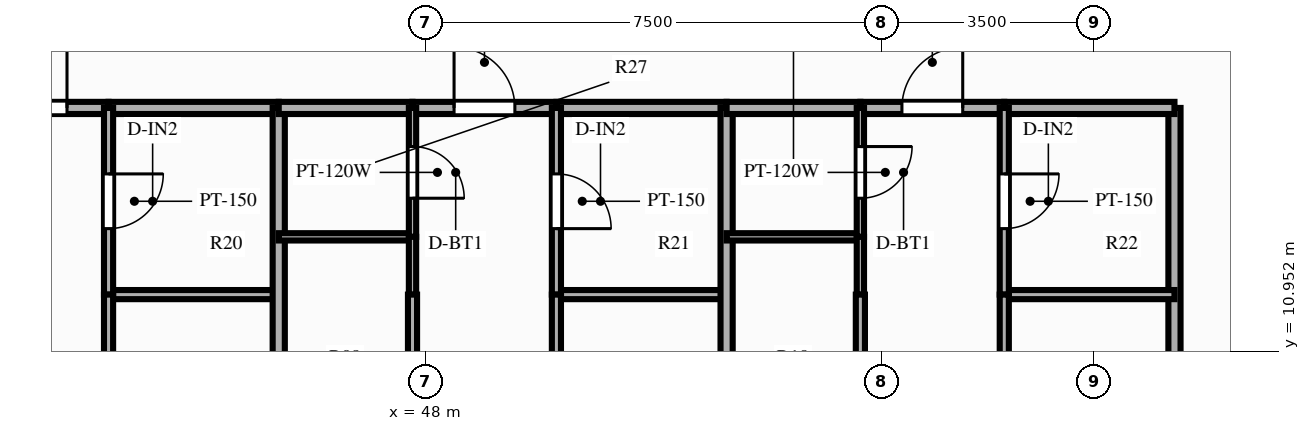
"""IFC4 building model, lengths in metres.
Left out: names, types, materials, properties, quantities, classifications, styles, units other than length and angle.
Written with IfcOpenShell. Run it as: python <this file> out.ifc"""

import sys

from ifc_helpers import new_model, si_unit, direction, frame, frame_2d, origin, place, context, subcontext, project, spatial, rectangle, extrude, source, transform, mapped, element, fill, save


model = new_model("IFC4")
c1 = context("Model", 3, precision=1e-05, world=origin(), true_north=direction((0.0, 1.0)))
c2 = subcontext(c1, "Body", "Model", "MODEL_VIEW")
j1 = project(units=[si_unit("LENGTHUNIT", "METRE"), si_unit("PLANEANGLEUNIT", "RADIAN")], contexts=[c1])
p1 = place(None, origin())
s1 = spatial("IfcSite", under=j1, at=p1, CompositionType="ELEMENT")
p2 = place(p1, origin())
s2 = spatial("IfcBuilding", under=s1, at=p2, CompositionType="ELEMENT")
p3 = place(p2, frame((0.0, 0.0, 22.4)))
s3 = spatial("IfcBuildingStorey", under=s2, at=p3, CompositionType="ELEMENT", Elevation=22.4)
p4 = place(p3, frame((60.32, 14.95, 0.0), z_axis=(0.0, 0.0, 1.0), x_axis=(0.0, -1.0, 0.0)))
e1 = element("IfcWall", 1, at=p4, inside=s3, PredefinedType="PARTITIONING", context=c2, shape_type="SweptSolid", body=[
    extrude(rectangle(XDim=11.8, YDim=0.2, at=frame_2d((5.9, 0.0))), origin(), (0.0, 0.0, 1.0), 2.79),
])
p5 = place(p3, frame((40.423, 14.95, 0.0), z_axis=(0.0, 0.0, 1.0), x_axis=(1.0, 0.0, 0.0)))
e2 = element("IfcWall", 2, at=p5, inside=s3, PredefinedType="PARTITIONING", context=c2, shape_type="SweptSolid", body=[
    extrude(rectangle(XDim=2.367, YDim=0.2, at=frame_2d((1.183, 0.0))), origin(), (0.0, 0.0, 1.0), 2.79),
])
p6 = place(p5, frame((0.683, 0.0, 0.0)))
e3 = element("IfcOpeningElement", 3, at=p6, cuts=e2, PredefinedType="OPENING", context=c2, shape_type="SweptSolid", body=[
    extrude(rectangle(XDim=1.0, YDim=2.15, at=frame_2d((0.5, 1.075))), frame((0.0, 0.112, 0.0), z_axis=(0.0, -1.0, 0.0), x_axis=(1.0, 0.0, 0.0)), (0.0, 0.0, 1.0), 0.224),
])
p7 = place(p3, frame((42.79, 14.95, 0.0), z_axis=(0.0, 0.0, 1.0), x_axis=(1.0, 0.0, 0.0)))
e4 = element("IfcWall", 4, at=p7, inside=s3, PredefinedType="PARTITIONING", context=c2, shape_type="SweptSolid", body=[
    extrude(rectangle(XDim=2.799, YDim=0.2, at=frame_2d((1.399, 0.0))), origin(), (0.0, 0.0, 1.0), 2.79),
])
p8 = place(p3, frame((42.79, 11.88, 0.0), z_axis=(0.0, 0.0, 1.0), x_axis=(1.0, 0.0, 0.0)))
e5 = element("IfcWall", 5, at=p8, inside=s3, PredefinedType="PARTITIONING", context=c2, shape_type="SweptSolid", body=[
    extrude(rectangle(XDim=2.799, YDim=0.15, at=frame_2d((1.399, 0.0))), origin(), (0.0, 0.0, 1.0), 2.79),
])
p9 = place(p3, frame((42.79, 14.95, 0.0), z_axis=(0.0, 0.0, 1.0), x_axis=(0.0, -1.0, 0.0)))
e6 = element("IfcWall", 6, at=p9, inside=s3, PredefinedType="PARTITIONING", context=c2, shape_type="SweptSolid", body=[
    extrude(rectangle(XDim=3.07, YDim=0.15, at=frame_2d((1.535, 0.0))), origin(), (0.0, 0.0, 1.0), 2.79),
])
p10 = place(p9, frame((1.085, 0.0, 0.0)))
e7 = element("IfcOpeningElement", 7, at=p10, cuts=e6, PredefinedType="OPENING", context=c2, shape_type="SweptSolid", body=[
    extrude(rectangle(XDim=0.9, YDim=2.1, at=frame_2d((0.45, 1.05))), frame((0.0, 0.087, 0.0), z_axis=(0.0, -1.0, 0.0), x_axis=(1.0, 0.0, 0.0)), (0.0, 0.0, 1.0), 0.174),
])
p11 = place(p3, frame((42.79, 11.88, 0.0), z_axis=(0.0, 0.0, 1.0), x_axis=(0.0, -1.0, 0.0)))
e8 = element("IfcWall", 8, at=p11, inside=s3, PredefinedType="PARTITIONING", context=c2, shape_type="SweptSolid", body=[
    extrude(rectangle(XDim=8.73, YDim=0.15, at=frame_2d((4.365, 0.0))), origin(), (0.0, 0.0, 1.0), 2.79),
])
p12 = place(p11, frame((3.609, 0.0, 0.0)))
e9 = element("IfcOpeningElement", 9, at=p12, cuts=e8, PredefinedType="OPENING", context=c2, shape_type="SweptSolid", body=[
    extrude(rectangle(XDim=0.9, YDim=2.1, at=frame_2d((0.45, 1.05))), frame((0.0, 0.087, 0.0), z_axis=(0.0, -1.0, 0.0), x_axis=(1.0, 0.0, 0.0)), (0.0, 0.0, 1.0), 0.174),
])
p13 = place(p3, frame((45.589, 14.95, 0.0), z_axis=(0.0, 0.0, 1.0), x_axis=(0.0, -1.0, 0.0)))
e10 = element("IfcWall", 10, at=p13, inside=s3, PredefinedType="PARTITIONING", context=c2, shape_type="SweptSolid", body=[
    extrude(rectangle(XDim=11.8, YDim=0.2, at=frame_2d((5.9, 0.0))), origin(), (0.0, 0.0, 1.0), 2.24),
])
p14 = place(p3, frame((45.589, 14.95, 0.0), z_axis=(0.0, 0.0, 1.0), x_axis=(1.0, 0.0, 0.0)))
e11 = element("IfcWall", 11, at=p14, inside=s3, PredefinedType="PARTITIONING", context=c2, shape_type="SweptSolid", body=[
    extrude(rectangle(XDim=2.2, YDim=0.2, at=frame_2d((1.1, 0.0))), origin(), (0.0, 0.0, 1.0), 2.79),
])
p15 = place(p3, frame((47.789, 14.95, 0.0), z_axis=(0.0, 0.0, 1.0), x_axis=(1.0, 0.0, 0.0)))
e12 = element("IfcWall", 12, at=p15, inside=s3, PredefinedType="PARTITIONING", context=c2, shape_type="SweptSolid", body=[
    extrude(rectangle(XDim=2.367, YDim=0.2, at=frame_2d((1.183, 0.0))), origin(), (0.0, 0.0, 1.0), 2.79),
])
p16 = place(p15, frame((0.683, 0.0, 0.0)))
e13 = element("IfcOpeningElement", 13, at=p16, cuts=e12, PredefinedType="OPENING", context=c2, shape_type="SweptSolid", body=[
    extrude(rectangle(XDim=1.0, YDim=2.15, at=frame_2d((0.5, 1.075))), frame((0.0, 0.112, 0.0), z_axis=(0.0, -1.0, 0.0), x_axis=(1.0, 0.0, 0.0)), (0.0, 0.0, 1.0), 0.224),
])
p17 = place(p3, frame((50.156, 14.95, 0.0), z_axis=(0.0, 0.0, 1.0), x_axis=(1.0, 0.0, 0.0)))
e14 = element("IfcWall", 14, at=p17, inside=s3, PredefinedType="PARTITIONING", context=c2, shape_type="SweptSolid", body=[
    extrude(rectangle(XDim=2.799, YDim=0.2, at=frame_2d((1.399, 0.0))), origin(), (0.0, 0.0, 1.0), 2.79),
])
p18 = place(p3, frame((45.589, 12.83, 0.0), z_axis=(0.0, 0.0, 1.0), x_axis=(1.0, 0.0, 0.0)))
e15 = element("IfcWall", 15, at=p18, inside=s3, PredefinedType="PARTITIONING", context=c2, shape_type="SweptSolid", body=[
    extrude(rectangle(XDim=2.2, YDim=0.12, at=frame_2d((1.1, 0.0))), origin(), (0.0, 0.0, 1.0), 2.79),
])
p19 = place(p3, frame((50.156, 11.88, 0.0), z_axis=(0.0, 0.0, 1.0), x_axis=(1.0, 0.0, 0.0)))
e16 = element("IfcWall", 16, at=p19, inside=s3, PredefinedType="PARTITIONING", context=c2, shape_type="SweptSolid", body=[
    extrude(rectangle(XDim=2.799, YDim=0.15, at=frame_2d((1.399, 0.0))), origin(), (0.0, 0.0, 1.0), 2.79),
])
p20 = place(p3, frame((47.789, 14.95, 0.0), z_axis=(0.0, 0.0, 1.0), x_axis=(0.0, -1.0, 0.0)))
e17 = element("IfcWall", 17, at=p20, inside=s3, PredefinedType="PARTITIONING", context=c2, shape_type="SweptSolid", body=[
    extrude(rectangle(XDim=2.12, YDim=0.12, at=frame_2d((1.06, 0.0))), origin(), (0.0, 0.0, 1.0), 2.79),
])
p21 = place(p20, frame((0.635, 0.0, 0.0)))
e18 = element("IfcOpeningElement", 18, at=p21, cuts=e17, PredefinedType="OPENING", context=c2, shape_type="SweptSolid", body=[
    extrude(rectangle(XDim=0.85, YDim=2.05, at=frame_2d((0.425, 1.025))), frame((0.0, 0.072, 0.0), z_axis=(0.0, -1.0, 0.0), x_axis=(1.0, 0.0, 0.0)), (0.0, 0.0, 1.0), 0.144),
])
p22 = place(p3, frame((47.789, 12.83, 0.0), z_axis=(0.0, 0.0, 1.0), x_axis=(0.0, -1.0, 0.0)))
e19 = element("IfcWall", 19, at=p22, inside=s3, PredefinedType="PARTITIONING", context=c2, shape_type="SweptSolid", body=[
    extrude(rectangle(XDim=0.95, YDim=0.12, at=frame_2d((0.475, 0.0))), origin(), (0.0, 0.0, 1.0), 2.79),
])
p23 = place(p3, frame((47.789, 11.88, 0.0), z_axis=(0.0, 0.0, 1.0), x_axis=(0.0, -1.0, 0.0)))
e20 = element("IfcWall", 20, at=p23, inside=s3, PredefinedType="PARTITIONING", context=c2, shape_type="SweptSolid", body=[
    extrude(rectangle(XDim=8.73, YDim=0.15, at=frame_2d((4.365, 0.0))), origin(), (0.0, 0.0, 1.0), 2.79),
])
p24 = place(p23, frame((3.609, 0.0, 0.0)))
e21 = element("IfcOpeningElement", 21, at=p24, cuts=e20, PredefinedType="OPENING", context=c2, shape_type="SweptSolid", body=[
    extrude(rectangle(XDim=0.9, YDim=2.1, at=frame_2d((0.45, 1.05))), frame((0.0, 0.087, 0.0), z_axis=(0.0, -1.0, 0.0), x_axis=(1.0, 0.0, 0.0)), (0.0, 0.0, 1.0), 0.174),
])
p25 = place(p3, frame((50.156, 14.95, 0.0), z_axis=(0.0, 0.0, 1.0), x_axis=(0.0, -1.0, 0.0)))
e22 = element("IfcWall", 22, at=p25, inside=s3, PredefinedType="PARTITIONING", context=c2, shape_type="SweptSolid", body=[
    extrude(rectangle(XDim=3.07, YDim=0.15, at=frame_2d((1.535, 0.0))), origin(), (0.0, 0.0, 1.0), 2.79),
])
p26 = place(p25, frame((1.085, 0.0, 0.0)))
e23 = element("IfcOpeningElement", 23, at=p26, cuts=e22, PredefinedType="OPENING", context=c2, shape_type="SweptSolid", body=[
    extrude(rectangle(XDim=0.9, YDim=2.1, at=frame_2d((0.45, 1.05))), frame((0.0, 0.087, 0.0), z_axis=(0.0, -1.0, 0.0), x_axis=(1.0, 0.0, 0.0)), (0.0, 0.0, 1.0), 0.174),
])
p27 = place(p3, frame((50.156, 11.88, 0.0), z_axis=(0.0, 0.0, 1.0), x_axis=(0.0, -1.0, 0.0)))
e24 = element("IfcWall", 24, at=p27, inside=s3, PredefinedType="PARTITIONING", context=c2, shape_type="SweptSolid", body=[
    extrude(rectangle(XDim=8.73, YDim=0.15, at=frame_2d((4.365, 0.0))), origin(), (0.0, 0.0, 1.0), 2.79),
])
p28 = place(p27, frame((3.609, 0.0, 0.0)))
e25 = element("IfcOpeningElement", 25, at=p28, cuts=e24, PredefinedType="OPENING", context=c2, shape_type="SweptSolid", body=[
    extrude(rectangle(XDim=0.9, YDim=2.1, at=frame_2d((0.45, 1.05))), frame((0.0, 0.087, 0.0), z_axis=(0.0, -1.0, 0.0), x_axis=(1.0, 0.0, 0.0)), (0.0, 0.0, 1.0), 0.174),
])
p29 = place(p3, frame((52.954, 14.95, 0.0), z_axis=(0.0, 0.0, 1.0), x_axis=(0.0, -1.0, 0.0)))
e26 = element("IfcWall", 26, at=p29, inside=s3, PredefinedType="PARTITIONING", context=c2, shape_type="SweptSolid", body=[
    extrude(rectangle(XDim=11.8, YDim=0.2, at=frame_2d((5.9, 0.0))), origin(), (0.0, 0.0, 1.0), 2.79),
])
p30 = place(p3, frame((52.954, 14.95, 0.0), z_axis=(0.0, 0.0, 1.0), x_axis=(1.0, 0.0, 0.0)))
e27 = element("IfcWall", 27, at=p30, inside=s3, PredefinedType="PARTITIONING", context=c2, shape_type="SweptSolid", body=[
    extrude(rectangle(XDim=2.2, YDim=0.2, at=frame_2d((1.1, 0.0))), origin(), (0.0, 0.0, 1.0), 2.79),
])
p31 = place(p3, frame((55.154, 14.95, 0.0), z_axis=(0.0, 0.0, 1.0), x_axis=(1.0, 0.0, 0.0)))
e28 = element("IfcWall", 28, at=p31, inside=s3, PredefinedType="PARTITIONING", context=c2, shape_type="SweptSolid", body=[
    extrude(rectangle(XDim=2.367, YDim=0.2, at=frame_2d((1.183, 0.0))), origin(), (0.0, 0.0, 1.0), 2.79),
])
p32 = place(p31, frame((0.683, 0.0, 0.0)))
e29 = element("IfcOpeningElement", 29, at=p32, cuts=e28, PredefinedType="OPENING", context=c2, shape_type="SweptSolid", body=[
    extrude(rectangle(XDim=1.0, YDim=2.15, at=frame_2d((0.5, 1.075))), frame((0.0, 0.112, 0.0), z_axis=(0.0, -1.0, 0.0), x_axis=(1.0, 0.0, 0.0)), (0.0, 0.0, 1.0), 0.224),
])
p33 = place(p3, frame((57.521, 14.95, 0.0), z_axis=(0.0, 0.0, 1.0), x_axis=(1.0, 0.0, 0.0)))
e30 = element("IfcWall", 30, at=p33, inside=s3, PredefinedType="PARTITIONING", context=c2, shape_type="SweptSolid", body=[
    extrude(rectangle(XDim=2.799, YDim=0.2, at=frame_2d((1.399, 0.0))), origin(), (0.0, 0.0, 1.0), 2.79),
])
p34 = place(p3, frame((52.954, 12.83, 0.0), z_axis=(0.0, 0.0, 1.0), x_axis=(1.0, 0.0, 0.0)))
e31 = element("IfcWall", 31, at=p34, inside=s3, PredefinedType="PARTITIONING", context=c2, shape_type="SweptSolid", body=[
    extrude(rectangle(XDim=2.2, YDim=0.12, at=frame_2d((1.1, 0.0))), origin(), (0.0, 0.0, 1.0), 2.79),
])
p35 = place(p3, frame((57.521, 11.88, 0.0), z_axis=(0.0, 0.0, 1.0), x_axis=(1.0, 0.0, 0.0)))
e32 = element("IfcWall", 32, at=p35, inside=s3, PredefinedType="PARTITIONING", context=c2, shape_type="SweptSolid", body=[
    extrude(rectangle(XDim=2.799, YDim=0.15, at=frame_2d((1.399, 0.0))), origin(), (0.0, 0.0, 1.0), 2.79),
])
p36 = place(p3, frame((55.154, 14.95, 0.0), z_axis=(0.0, 0.0, 1.0), x_axis=(0.0, -1.0, 0.0)))
e33 = element("IfcWall", 33, at=p36, inside=s3, PredefinedType="PARTITIONING", context=c2, shape_type="SweptSolid", body=[
    extrude(rectangle(XDim=2.12, YDim=0.12, at=frame_2d((1.06, 0.0))), origin(), (0.0, 0.0, 1.0), 2.79),
])
p37 = place(p36, frame((0.635, 0.0, 0.0)))
e34 = element("IfcOpeningElement", 34, at=p37, cuts=e33, PredefinedType="OPENING", context=c2, shape_type="SweptSolid", body=[
    extrude(rectangle(XDim=0.85, YDim=2.05, at=frame_2d((0.425, 1.025))), frame((0.0, 0.072, 0.0), z_axis=(0.0, -1.0, 0.0), x_axis=(1.0, 0.0, 0.0)), (0.0, 0.0, 1.0), 0.144),
])
p38 = place(p3, frame((55.154, 12.83, 0.0), z_axis=(0.0, 0.0, 1.0), x_axis=(0.0, -1.0, 0.0)))
e35 = element("IfcWall", 35, at=p38, inside=s3, PredefinedType="PARTITIONING", context=c2, shape_type="SweptSolid", body=[
    extrude(rectangle(XDim=0.95, YDim=0.12, at=frame_2d((0.475, 0.0))), origin(), (0.0, 0.0, 1.0), 2.79),
])
p39 = place(p3, frame((55.154, 11.88, 0.0), z_axis=(0.0, 0.0, 1.0), x_axis=(0.0, -1.0, 0.0)))
e36 = element("IfcWall", 36, at=p39, inside=s3, PredefinedType="PARTITIONING", context=c2, shape_type="SweptSolid", body=[
    extrude(rectangle(XDim=8.73, YDim=0.15, at=frame_2d((4.365, 0.0))), origin(), (0.0, 0.0, 1.0), 2.79),
])
p40 = place(p39, frame((3.609, 0.0, 0.0)))
e37 = element("IfcOpeningElement", 37, at=p40, cuts=e36, PredefinedType="OPENING", context=c2, shape_type="SweptSolid", body=[
    extrude(rectangle(XDim=0.9, YDim=2.1, at=frame_2d((0.45, 1.05))), frame((0.0, 0.087, 0.0), z_axis=(0.0, -1.0, 0.0), x_axis=(1.0, 0.0, 0.0)), (0.0, 0.0, 1.0), 0.174),
])
p41 = place(p3, frame((57.521, 14.95, 0.0), z_axis=(0.0, 0.0, 1.0), x_axis=(0.0, -1.0, 0.0)))
e38 = element("IfcWall", 38, at=p41, inside=s3, PredefinedType="PARTITIONING", context=c2, shape_type="SweptSolid", body=[
    extrude(rectangle(XDim=3.07, YDim=0.15, at=frame_2d((1.535, 0.0))), origin(), (0.0, 0.0, 1.0), 2.79),
])
p42 = place(p41, frame((1.085, 0.0, 0.0)))
e39 = element("IfcOpeningElement", 39, at=p42, cuts=e38, PredefinedType="OPENING", context=c2, shape_type="SweptSolid", body=[
    extrude(rectangle(XDim=0.9, YDim=2.1, at=frame_2d((0.45, 1.05))), frame((0.0, 0.087, 0.0), z_axis=(0.0, -1.0, 0.0), x_axis=(1.0, 0.0, 0.0)), (0.0, 0.0, 1.0), 0.174),
])
p43 = place(p3, frame((57.521, 11.88, 0.0), z_axis=(0.0, 0.0, 1.0), x_axis=(0.0, -1.0, 0.0)))
e40 = element("IfcWall", 40, at=p43, inside=s3, PredefinedType="PARTITIONING", context=c2, shape_type="SweptSolid", body=[
    extrude(rectangle(XDim=8.73, YDim=0.15, at=frame_2d((4.365, 0.0))), origin(), (0.0, 0.0, 1.0), 2.79),
])
p44 = place(p43, frame((3.609, 0.0, 0.0)))
e41 = element("IfcOpeningElement", 41, at=p44, cuts=e40, PredefinedType="OPENING", context=c2, shape_type="SweptSolid", body=[
    extrude(rectangle(XDim=0.9, YDim=2.1, at=frame_2d((0.45, 1.05))), frame((0.0, 0.087, 0.0), z_axis=(0.0, -1.0, 0.0), x_axis=(1.0, 0.0, 0.0)), (0.0, 0.0, 1.0), 0.174),
])
m1 = source(origin(), c2, "Body", "SweptSolid", [
    extrude(rectangle(XDim=1.0, YDim=2.15, at=frame_2d((0.5, 1.075))), frame((0.0, 0.025, 0.0), z_axis=(0.0, -1.0, 0.0), x_axis=(1.0, 0.0, 0.0)), (0.0, 0.0, 1.0), 0.05),
])
p45 = place(p6, origin())
e42 = element("IfcDoor", 42, at=p45, inside=s3, OperationType="SINGLE_SWING_RIGHT", PredefinedType="DOOR", context=c2, shape_type="MappedRepresentation", body=[
    mapped(m1, transform((0.0, 0.0, 0.0), scale=1.0)),
])
fill(e3, e42)
m2 = source(origin(), c2, "Body", "SweptSolid", [
    extrude(rectangle(XDim=0.9, YDim=2.1, at=frame_2d((0.45, 1.05))), frame((0.0, 0.025, 0.0), z_axis=(0.0, -1.0, 0.0), x_axis=(1.0, 0.0, 0.0)), (0.0, 0.0, 1.0), 0.05),
])
p46 = place(p10, origin())
e43 = element("IfcDoor", 43, at=p46, inside=s3, OperationType="SINGLE_SWING_LEFT", PredefinedType="DOOR", context=c2, shape_type="MappedRepresentation", body=[
    mapped(m2, transform((0.0, 0.0, 0.0), scale=1.0)),
])
fill(e7, e43)
p47 = place(p16, origin())
e44 = element("IfcDoor", 44, at=p47, inside=s3, OperationType="SINGLE_SWING_LEFT", PredefinedType="DOOR", context=c2, shape_type="MappedRepresentation", body=[
    mapped(m1, transform((0.0, 0.0, 0.0), scale=1.0)),
])
fill(e13, e44)
m3 = source(origin(), c2, "Body", "SweptSolid", [
    extrude(rectangle(XDim=0.85, YDim=2.05, at=frame_2d((0.425, 1.025))), frame((0.0, 0.025, 0.0), z_axis=(0.0, -1.0, 0.0), x_axis=(1.0, 0.0, 0.0)), (0.0, 0.0, 1.0), 0.05),
])
p48 = place(p21, origin())
e45 = element("IfcDoor", 45, at=p48, inside=s3, OperationType="SINGLE_SWING_RIGHT", PredefinedType="DOOR", context=c2, shape_type="MappedRepresentation", body=[
    mapped(m3, transform((0.0, 0.0, 0.0), scale=1.0)),
])
fill(e18, e45)
p49 = place(p26, origin())
e46 = element("IfcDoor", 46, at=p49, inside=s3, OperationType="SINGLE_SWING_RIGHT", PredefinedType="DOOR", context=c2, shape_type="MappedRepresentation", body=[
    mapped(m2, transform((0.0, 0.0, 0.0), scale=1.0)),
])
fill(e23, e46)
p50 = place(p32, origin())
e47 = element("IfcDoor", 47, at=p50, inside=s3, OperationType="SINGLE_SWING_RIGHT", PredefinedType="DOOR", context=c2, shape_type="MappedRepresentation", body=[
    mapped(m1, transform((0.0, 0.0, 0.0), scale=1.0)),
])
fill(e29, e47)
p51 = place(p37, origin())
e48 = element("IfcDoor", 48, at=p51, inside=s3, OperationType="SINGLE_SWING_LEFT", PredefinedType="DOOR", context=c2, shape_type="MappedRepresentation", body=[
    mapped(m3, transform((0.0, 0.0, 0.0), scale=1.0)),
])
fill(e34, e48)
p52 = place(p42, origin())
e49 = element("IfcDoor", 49, at=p52, inside=s3, OperationType="SINGLE_SWING_LEFT", PredefinedType="DOOR", context=c2, shape_type="MappedRepresentation", body=[
    mapped(m2, transform((0.0, 0.0, 0.0), scale=1.0)),
])
fill(e39, e49)
save(model, sys.argv[1])
